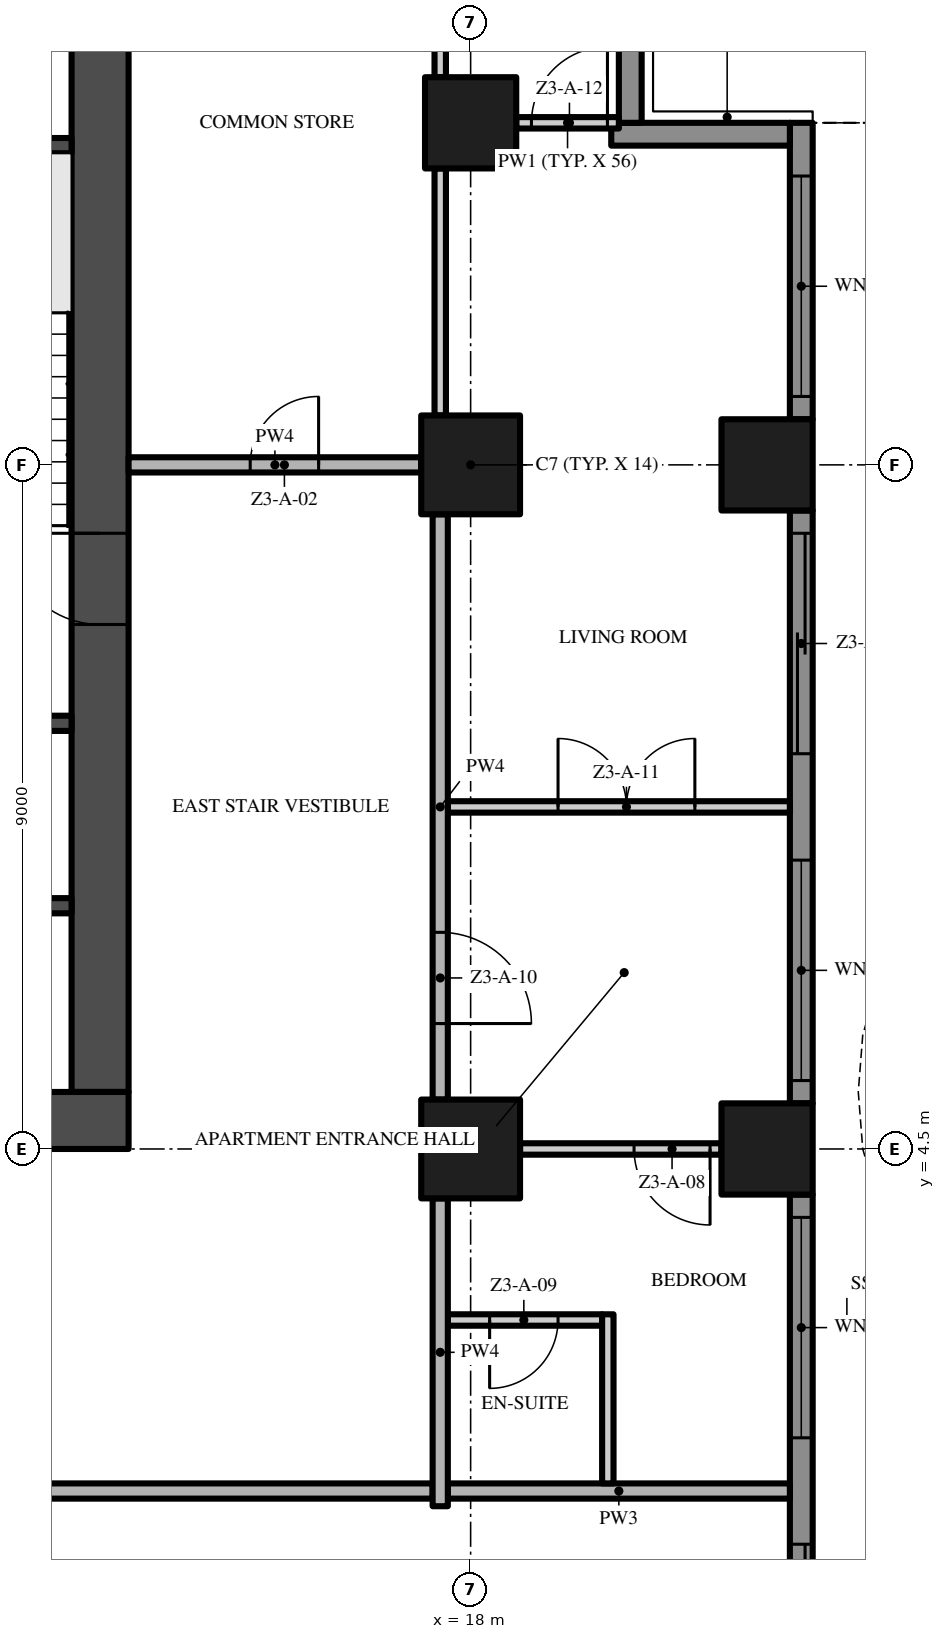
"""IFC4 building model, lengths in metres.
Left out: names, types, materials, properties, quantities, classifications, styles, units other than length and angle.
Written with IfcOpenShell. Run it as: python <this file> out.ifc"""

import sys

from ifc_helpers import new_model, si_unit, direction, frame, frame_2d, origin, origin_2d, place, context, subcontext, project, spatial, polyline, rectangle, outline, extrude, element, fill, save


model = new_model("IFC4")
c1 = context("Model", 3, precision=1e-05, world=origin(), true_north=direction((0.0, 1.0)))
c2 = subcontext(c1, "Body", "Model", "MODEL_VIEW")
j1 = project(units=[si_unit("LENGTHUNIT", "METRE"), si_unit("PLANEANGLEUNIT", "RADIAN")], contexts=[c1])
p1 = place(None, origin())
s1 = spatial("IfcSite", under=j1, at=p1, CompositionType="ELEMENT")
p2 = place(p1, origin())
s2 = spatial("IfcBuilding", under=s1, at=p2, CompositionType="ELEMENT")
p3 = place(p2, frame((0.0, 0.0, 128.8)))
s3 = spatial("IfcBuildingStorey", under=s2, at=p3, CompositionType="ELEMENT", Elevation=128.8)
p4 = place(p3, frame((-13.5, 4.875, -0.3), z_axis=(0.0, 0.0, 1.0), x_axis=(1.0, 0.0, 0.0)))
e1 = element("IfcWall", 1, at=p4, inside=s3, PredefinedType="SHEAR", context=c2, shape_type="SweptSolid", body=[
    extrude(rectangle(XDim=27.0, YDim=0.75, at=frame_2d((13.5, 0.0))), origin(), (0.0, 0.0, 1.0), 3.8),
])
p5 = place(p4, frame((12.0, 0.0, 0.3)))
e2 = element("IfcOpeningElement", 2, at=p5, cuts=e1, PredefinedType="OPENING", context=c2, shape_type="SweptSolid", body=[
    extrude(rectangle(XDim=3.0, YDim=2.4, at=frame_2d((1.5, 1.2))), frame((0.0, 0.385, 0.0), z_axis=(0.0, -1.0, 0.0), x_axis=(1.0, 0.0, 0.0)), (0.0, 0.0, 1.0), 0.77),
])
p6 = place(p4, frame((4.9, 0.0, 0.3)))
e3 = element("IfcOpeningElement", 3, at=p6, cuts=e1, PredefinedType="OPENING", context=c2, shape_type="SweptSolid", body=[
    extrude(rectangle(XDim=1.2, YDim=2.2, at=frame_2d((0.6, 1.1))), frame((0.0, 0.385, 0.0), z_axis=(0.0, -1.0, 0.0), x_axis=(1.0, 0.0, 0.0)), (0.0, 0.0, 1.0), 0.77),
])
p7 = place(p4, frame((20.75, 0.0, 0.3)))
e4 = element("IfcOpeningElement", 4, at=p7, cuts=e1, PredefinedType="OPENING", context=c2, shape_type="SweptSolid", body=[
    extrude(rectangle(XDim=1.5, YDim=2.2, at=frame_2d((0.75, 1.1))), frame((0.0, 0.385, 0.0), z_axis=(0.0, -1.0, 0.0), x_axis=(1.0, 0.0, 0.0)), (0.0, 0.0, 1.0), 0.77),
])
p8 = place(p4, frame((17.4, 0.0, 0.3)))
e5 = element("IfcOpeningElement", 5, at=p8, cuts=e1, PredefinedType="OPENING", context=c2, shape_type="SweptSolid", body=[
    extrude(rectangle(XDim=1.2, YDim=2.2, at=frame_2d((0.6, 1.1))), frame((0.0, 0.385, 0.0), z_axis=(0.0, -1.0, 0.0), x_axis=(1.0, 0.0, 0.0)), (0.0, 0.0, 1.0), 0.77),
])
p9 = place(p3, frame((13.125, 5.25, -0.3), z_axis=(0.0, 0.0, 1.0), x_axis=(0.0, 1.0, 0.0)))
e6 = element("IfcWall", 6, at=p9, inside=s3, PredefinedType="SHEAR", context=c2, shape_type="SweptSolid", body=[
    extrude(rectangle(XDim=16.5, YDim=0.75, at=frame_2d((8.25, 0.0))), origin(), (0.0, 0.0, 1.0), 3.8),
])
p10 = place(p9, frame((6.15, 0.0, 0.3)))
e7 = element("IfcOpeningElement", 7, at=p10, cuts=e6, PredefinedType="OPENING", context=c2, shape_type="SweptSolid", body=[
    extrude(rectangle(XDim=1.2, YDim=2.2, at=frame_2d((0.6, 1.1))), frame((0.0, 0.385, 0.0), z_axis=(0.0, -1.0, 0.0), x_axis=(1.0, 0.0, 0.0)), (0.0, 0.0, 1.0), 0.77),
])
for number, where, z_axis, x_axis in (
    (8, (18.0, 13.5, 0.0), (0.0, 0.0, 1.0), (1.0, 0.0, 0.0)),
    (9, (18.0, 4.5, 0.0), (0.0, 0.0, 1.0), (1.0, 0.0, 0.0)),
):
    element("IfcColumn", number, at=place(p3, frame(where, z_axis=z_axis, x_axis=x_axis)), inside=s3, PredefinedType="COLUMN", context=c2, shape_type="SweptSolid", body=[
        extrude(rectangle(XDim=1.3, YDim=1.3, at=origin_2d()), origin(), (0.0, 0.0, 1.0), 3.5),
    ])
for number, where, z_axis, x_axis in (
    (10, (21.9, 13.5, 0.0), (0.0, 0.0, 1.0), (1.0, 0.0, 0.0)),
    (11, (18.0, 18.0, 0.0), (0.0, 0.0, 1.0), (1.0, 0.0, 0.0)),
    (12, (21.9, 4.5, 0.0), (0.0, 0.0, 1.0), (1.0, 0.0, 0.0)),
):
    element("IfcColumn", number, at=place(p3, frame(where, z_axis=z_axis, x_axis=x_axis)), inside=s3, PredefinedType="COLUMN", context=c2, shape_type="SweptSolid", body=[
        extrude(rectangle(XDim=1.2, YDim=1.2, at=origin_2d()), origin(), (0.0, 0.0, 1.0), 3.5),
    ])
p11 = place(p3, frame((22.35, 3.9, 0.0), z_axis=(0.0, 0.0, 1.0), x_axis=(0.0, -1.0, 0.0)))
e13 = element("IfcWall", 13, at=p11, inside=s3, PredefinedType="SOLIDWALL", context=c2, shape_type="SweptSolid", body=[
    extrude(rectangle(XDim=7.8, YDim=0.3, at=frame_2d((3.9, 0.0))), origin(), (0.0, 0.0, 1.0), 3.5),
])
p12 = place(p11, frame((4.6, 0.0, 0.0)))
e14 = element("IfcOpeningElement", 14, at=p12, cuts=e13, PredefinedType="OPENING", context=c2, shape_type="SweptSolid", body=[
    extrude(rectangle(XDim=2.9, YDim=2.4, at=frame_2d((1.45, 1.2))), frame((0.0, 0.16, 0.0), z_axis=(0.0, -1.0, 0.0), x_axis=(1.0, 0.0, 0.0)), (0.0, 0.0, 1.0), 0.32),
])
p13 = place(p11, frame((0.3, 0.0, 0.45)))
e15 = element("IfcOpeningElement", 15, at=p13, cuts=e13, PredefinedType="OPENING", context=c2, shape_type="SweptSolid", body=[
    extrude(rectangle(XDim=2.9, YDim=2.65, at=frame_2d((1.45, 1.325))), frame((0.0, 0.16, 0.0), z_axis=(0.0, -1.0, 0.0), x_axis=(1.0, 0.0, 0.0)), (0.0, 0.0, 1.0), 0.32),
])
p14 = place(p3, frame((22.35, 12.9, 0.0), z_axis=(0.0, 0.0, 1.0), x_axis=(0.0, -1.0, 0.0)))
e16 = element("IfcWall", 16, at=p14, inside=s3, PredefinedType="SOLIDWALL", context=c2, shape_type="SweptSolid", body=[
    extrude(rectangle(XDim=7.8, YDim=0.3, at=frame_2d((3.9, 0.0))), origin(), (0.0, 0.0, 1.0), 3.5),
])
p15 = place(p14, frame((4.6, 0.0, 0.45)))
e17 = element("IfcOpeningElement", 17, at=p15, cuts=e16, PredefinedType="OPENING", context=c2, shape_type="SweptSolid", body=[
    extrude(rectangle(XDim=2.9, YDim=2.65, at=frame_2d((1.45, 1.325))), frame((0.0, 0.16, 0.0), z_axis=(0.0, -1.0, 0.0), x_axis=(1.0, 0.0, 0.0)), (0.0, 0.0, 1.0), 0.32),
])
p16 = place(p14, frame((0.3, 0.0, 0.0)))
e18 = element("IfcOpeningElement", 18, at=p16, cuts=e16, PredefinedType="OPENING", context=c2, shape_type="SweptSolid", body=[
    extrude(rectangle(XDim=2.9, YDim=2.4, at=frame_2d((1.45, 1.2))), frame((0.0, 0.16, 0.0), z_axis=(0.0, -1.0, 0.0), x_axis=(1.0, 0.0, 0.0)), (0.0, 0.0, 1.0), 0.32),
])
p17 = place(p3, frame((22.35, 18.0, 0.0), z_axis=(0.0, 0.0, 1.0), x_axis=(0.0, -1.0, 0.0)))
e19 = element("IfcWall", 19, at=p17, inside=s3, PredefinedType="SOLIDWALL", context=c2, shape_type="SweptSolid", body=[
    extrude(rectangle(XDim=3.9, YDim=0.3, at=frame_2d((1.95, 0.0))), origin(), (0.0, 0.0, 1.0), 3.5),
])
p18 = place(p17, frame((0.7, 0.0, 0.45)))
e20 = element("IfcOpeningElement", 20, at=p18, cuts=e19, PredefinedType="OPENING", context=c2, shape_type="SweptSolid", body=[
    extrude(rectangle(XDim=2.9, YDim=2.65, at=frame_2d((1.45, 1.325))), frame((0.0, 0.16, 0.0), z_axis=(0.0, -1.0, 0.0), x_axis=(1.0, 0.0, 0.0)), (0.0, 0.0, 1.0), 0.32),
])
p19 = place(p3, frame((19.85, 17.85, 0.0), z_axis=(0.0, 0.0, 1.0), x_axis=(1.0, 0.0, 0.0)))
e21 = element("IfcWall", 21, at=p19, inside=s3, PredefinedType="SOLIDWALL", context=c2, shape_type="SweptSolid", body=[
    extrude(rectangle(XDim=2.35, YDim=0.3, at=frame_2d((1.175, 0.0))), origin(), (0.0, 0.0, 1.0), 3.5),
])
p20 = place(p3, frame((20.1, 20.25, 0.0), z_axis=(0.0, 0.0, 1.0), x_axis=(0.0, -1.0, 0.0)))
e22 = element("IfcWall", 22, at=p20, inside=s3, PredefinedType="SOLIDWALL", context=c2, shape_type="SweptSolid", body=[
    extrude(rectangle(XDim=2.25, YDim=0.3, at=frame_2d((1.125, 0.0))), origin(), (0.0, 0.0, 1.0), 3.5),
])
p21 = place(p3, origin())
e23 = element("IfcWall", 23, at=p21, inside=s3, PredefinedType="USERDEFINED", context=c2, shape_type="SweptSolid", body=[
    extrude(outline(polyline([(24.3, -13.5), (23.595, -12.0), (23.159, -10.5), (23.1, -9.75), (23.159, -9.0), (23.595, -7.5), (24.3, -6.0), (25.005, -4.5), (25.441, -3.0), (25.5, -2.25), (25.441, -1.5), (25.005, 0.0), (24.3, 1.5), (23.595, 3.0), (23.159, 4.5), (23.1, 5.25), (23.159, 6.0), (23.595, 7.5), (24.3, 9.0), (25.005, 10.5), (25.441, 12.0), (25.5, 12.75), (25.441, 13.5), (25.005, 15.0), (24.3, 16.5), (23.595, 18.0), (23.368, 17.894), (24.074, 16.394), (24.771, 14.911), (25.194, 13.455), (25.249, 12.75), (25.194, 12.045), (24.771, 10.589), (24.074, 9.106), (23.36, 7.589), (22.911, 6.045), (22.849, 5.25), (22.911, 4.455), (23.36, 2.911), (24.074, 1.394), (24.771, -0.089), (25.194, -1.545), (25.249, -2.25), (25.194, -2.955), (24.771, -4.411), (24.074, -5.894), (23.36, -7.411), (22.911, -8.955), (22.849, -9.75), (22.911, -10.545), (23.36, -12.089), (24.074, -13.606), (24.3, -13.5)])), origin(), (0.0, 0.0, 1.0), 0.9),
])
for number, where, z_axis, x_axis in (
    (24, (9.65, 7.7, 0.0), (0.0, 0.0, 1.0), (1.0, 0.0, 0.0)),
    (25, (9.65, 10.1, 0.0), (0.0, 0.0, 1.0), (1.0, 0.0, 0.0)),
    (26, (9.65, 17.7, 0.0), (0.0, 0.0, 1.0), (1.0, 0.0, 0.0)),
):
    element("IfcWall", number, at=place(p3, frame(where, z_axis=z_axis, x_axis=x_axis)), inside=s3, PredefinedType="SHEAR", context=c2, shape_type="SweptSolid", body=[
        extrude(rectangle(XDim=3.1, YDim=0.2, at=frame_2d((1.55, 0.0))), origin(), (0.0, 0.0, 1.0), 3.5),
    ])
p22 = place(p3, frame((17.5, 0.0, 0.0), z_axis=(0.0, 0.0, 1.0), x_axis=(-1.0, 0.0, 0.0)))
e27 = element("IfcWall", 27, at=p22, inside=s3, PredefinedType="PARTITIONING", context=c2, shape_type="SweptSolid", body=[
    extrude(rectangle(XDim=35.0, YDim=0.2, at=frame_2d((17.5, 0.0))), origin(), (0.0, 0.0, 1.0), 3.5),
])
p23 = place(p22, frame((16.75, 0.0, 0.0)))
e28 = element("IfcOpeningElement", 28, at=p23, cuts=e27, PredefinedType="OPENING", context=c2, shape_type="SweptSolid", body=[
    extrude(rectangle(XDim=1.5, YDim=2.4, at=frame_2d((0.75, 1.2))), frame((0.0, 0.11, 0.0), z_axis=(0.0, -1.0, 0.0), x_axis=(1.0, 0.0, 0.0)), (0.0, 0.0, 1.0), 0.22),
])
p24 = place(p3, frame((17.7, 0.0, 0.0), z_axis=(0.0, 0.0, 1.0), x_axis=(1.0, 0.0, 0.0)))
e29 = element("IfcWall", 29, at=p24, inside=s3, PredefinedType="PARTITIONING", context=c2, shape_type="SweptSolid", body=[
    extrude(rectangle(XDim=4.5, YDim=0.2, at=frame_2d((2.25, 0.0))), origin(), (0.0, 0.0, 1.0), 3.5),
])
p25 = place(p3, frame((19.73, 2.25, 0.0), z_axis=(0.0, 0.0, 1.0), x_axis=(-1.0, 0.0, 0.0)))
e30 = element("IfcWall", 30, at=p25, inside=s3, PredefinedType="PARTITIONING", context=c2, shape_type="SweptSolid", body=[
    extrude(rectangle(XDim=2.03, YDim=0.15, at=frame_2d((1.015, 0.0))), origin(), (0.0, 0.0, 1.0), 3.5),
])
p26 = place(p25, frame((0.58, 0.0, 0.0)))
e31 = element("IfcOpeningElement", 31, at=p26, cuts=e30, PredefinedType="OPENING", context=c2, shape_type="SweptSolid", body=[
    extrude(rectangle(XDim=0.9, YDim=2.1, at=frame_2d((0.45, 1.05))), frame((0.0, 0.085, 0.0), z_axis=(0.0, -1.0, 0.0), x_axis=(1.0, 0.0, 0.0)), (0.0, 0.0, 1.0), 0.17),
])
p27 = place(p3, frame((21.3, 4.5, 0.0), z_axis=(0.0, 0.0, 1.0), x_axis=(-1.0, 0.0, 0.0)))
e32 = element("IfcWall", 32, at=p27, inside=s3, PredefinedType="PARTITIONING", context=c2, shape_type="SweptSolid", body=[
    extrude(rectangle(XDim=2.65, YDim=0.15, at=frame_2d((1.325, 0.0))), origin(), (0.0, 0.0, 1.0), 3.5),
])
p28 = place(p27, frame((0.15, 0.0, 0.0)))
e33 = element("IfcOpeningElement", 33, at=p28, cuts=e32, PredefinedType="OPENING", context=c2, shape_type="SweptSolid", body=[
    extrude(rectangle(XDim=1.0, YDim=2.4, at=frame_2d((0.5, 1.2))), frame((0.0, 0.085, 0.0), z_axis=(0.0, -1.0, 0.0), x_axis=(1.0, 0.0, 0.0)), (0.0, 0.0, 1.0), 0.17),
])
p29 = place(p3, frame((17.7, 9.0, 0.0), z_axis=(0.0, 0.0, 1.0), x_axis=(1.0, 0.0, 0.0)))
e34 = element("IfcWall", 34, at=p29, inside=s3, PredefinedType="PARTITIONING", context=c2, shape_type="SweptSolid", body=[
    extrude(rectangle(XDim=4.5, YDim=0.15, at=frame_2d((2.25, 0.0))), origin(), (0.0, 0.0, 1.0), 3.5),
])
p30 = place(p29, frame((1.45, 0.0, 0.0)))
e35 = element("IfcOpeningElement", 35, at=p30, cuts=e34, PredefinedType="OPENING", context=c2, shape_type="SweptSolid", body=[
    extrude(rectangle(XDim=1.8, YDim=2.4, at=frame_2d((0.9, 1.2))), frame((0.0, 0.085, 0.0), z_axis=(0.0, -1.0, 0.0), x_axis=(1.0, 0.0, 0.0)), (0.0, 0.0, 1.0), 0.17),
])
p31 = place(p3, frame((13.5, 13.5, 0.0), z_axis=(0.0, 0.0, 1.0), x_axis=(1.0, 0.0, 0.0)))
e36 = element("IfcWall", 36, at=p31, inside=s3, PredefinedType="PARTITIONING", context=c2, shape_type="SweptSolid", body=[
    extrude(rectangle(XDim=3.85, YDim=0.2, at=frame_2d((1.925, 0.0))), origin(), (0.0, 0.0, 1.0), 3.5),
])
p32 = place(p31, frame((1.6, 0.0, 0.0)))
e37 = element("IfcOpeningElement", 37, at=p32, cuts=e36, PredefinedType="OPENING", context=c2, shape_type="SweptSolid", body=[
    extrude(rectangle(XDim=0.9, YDim=2.1, at=frame_2d((0.45, 1.05))), frame((0.0, 0.11, 0.0), z_axis=(0.0, -1.0, 0.0), x_axis=(1.0, 0.0, 0.0)), (0.0, 0.0, 1.0), 0.22),
])
p33 = place(p3, frame((18.6, 18.0, 0.0), z_axis=(0.0, 0.0, 1.0), x_axis=(1.0, 0.0, 0.0)))
e38 = element("IfcWall", 38, at=p33, inside=s3, PredefinedType="PARTITIONING", context=c2, shape_type="SweptSolid", body=[
    extrude(rectangle(XDim=1.35, YDim=0.15, at=frame_2d((0.675, 0.0))), origin(), (0.0, 0.0, 1.0), 3.5),
])
p34 = place(p33, frame((0.2, 0.0, 0.0)))
e39 = element("IfcOpeningElement", 39, at=p34, cuts=e38, PredefinedType="OPENING", context=c2, shape_type="SweptSolid", body=[
    extrude(rectangle(XDim=1.0, YDim=2.4, at=frame_2d((0.5, 1.2))), frame((0.0, 0.085, 0.0), z_axis=(0.0, -1.0, 0.0), x_axis=(1.0, 0.0, 0.0)), (0.0, 0.0, 1.0), 0.17),
])
p35 = place(p3, frame((17.6, -0.2, 0.0), z_axis=(0.0, 0.0, 1.0), x_axis=(0.0, 1.0, 0.0)))
e40 = element("IfcWall", 40, at=p35, inside=s3, PredefinedType="PARTITIONING", context=c2, shape_type="SweptSolid", body=[
    extrude(rectangle(XDim=4.05, YDim=0.2, at=frame_2d((2.025, 0.0))), origin(), (0.0, 0.0, 1.0), 3.5),
])
p36 = place(p3, frame((17.6, 12.85, 0.0), z_axis=(0.0, 0.0, 1.0), x_axis=(0.0, -1.0, 0.0)))
e41 = element("IfcWall", 41, at=p36, inside=s3, PredefinedType="PARTITIONING", context=c2, shape_type="SweptSolid", body=[
    extrude(rectangle(XDim=7.7, YDim=0.2, at=frame_2d((3.85, 0.0))), origin(), (0.0, 0.0, 1.0), 3.5),
])
p37 = place(p36, frame((5.5, 0.0, 0.0)))
e42 = element("IfcOpeningElement", 42, at=p37, cuts=e41, PredefinedType="OPENING", context=c2, shape_type="SweptSolid", body=[
    extrude(rectangle(XDim=1.2, YDim=2.4, at=frame_2d((0.6, 1.2))), frame((0.0, 0.11, 0.0), z_axis=(0.0, -1.0, 0.0), x_axis=(1.0, 0.0, 0.0)), (0.0, 0.0, 1.0), 0.22),
])
p38 = place(p3, frame((17.6, 14.15, 0.0), z_axis=(0.0, 0.0, 1.0), x_axis=(0.0, 1.0, 0.0)))
e43 = element("IfcWall", 43, at=p38, inside=s3, PredefinedType="PARTITIONING", context=c2, shape_type="SweptSolid", body=[
    extrude(rectangle(XDim=3.25, YDim=0.15, at=frame_2d((1.625, 0.0))), origin(), (0.0, 0.0, 1.0), 3.5),
])
p39 = place(p3, frame((17.6, 18.6, 0.0), z_axis=(0.0, 0.0, 1.0), x_axis=(0.0, 1.0, 0.0)))
e44 = element("IfcWall", 44, at=p39, inside=s3, PredefinedType="PARTITIONING", context=c2, shape_type="SweptSolid", body=[
    extrude(rectangle(XDim=2.7, YDim=0.15, at=frame_2d((1.35, 0.0))), origin(), (0.0, 0.0, 1.0), 3.5),
])
p40 = place(p3, frame((19.805, 0.1, 0.0), z_axis=(0.0, 0.0, 1.0), x_axis=(0.0, 1.0, 0.0)))
e45 = element("IfcWall", 45, at=p40, inside=s3, PredefinedType="PARTITIONING", context=c2, shape_type="SweptSolid", body=[
    extrude(rectangle(XDim=2.225, YDim=0.15, at=frame_2d((1.113, 0.0))), origin(), (0.0, 0.0, 1.0), 3.5),
])
p41 = place(p12, origin())
e46 = element("IfcDoor", 46, at=p41, inside=s3, OperationType="SINGLE_SWING_LEFT", PredefinedType="DOOR", context=c2, shape_type="SweptSolid", body=[
    extrude(rectangle(XDim=2.9, YDim=2.4, at=frame_2d((1.45, 1.2))), frame((0.0, 0.025, 0.0), z_axis=(0.0, -1.0, 0.0), x_axis=(1.0, 0.0, 0.0)), (0.0, 0.0, 1.0), 0.05),
])
fill(e14, e46)
p42 = place(p13, origin())
e47 = element("IfcWindow", 47, at=p42, inside=s3, PartitioningType="SINGLE_PANEL", PredefinedType="WINDOW", context=c2, shape_type="SweptSolid", body=[
    extrude(rectangle(XDim=2.9, YDim=2.65, at=frame_2d((1.45, 1.325))), frame((0.0, 0.03, 0.0), z_axis=(0.0, -1.0, 0.0), x_axis=(1.0, 0.0, 0.0)), (0.0, 0.0, 1.0), 0.06),
])
fill(e15, e47)
p43 = place(p15, origin())
e48 = element("IfcWindow", 48, at=p43, inside=s3, PartitioningType="SINGLE_PANEL", PredefinedType="WINDOW", context=c2, shape_type="SweptSolid", body=[
    extrude(rectangle(XDim=2.9, YDim=2.65, at=frame_2d((1.45, 1.325))), frame((0.0, 0.03, 0.0), z_axis=(0.0, -1.0, 0.0), x_axis=(1.0, 0.0, 0.0)), (0.0, 0.0, 1.0), 0.06),
])
fill(e17, e48)
p44 = place(p16, origin())
e49 = element("IfcDoor", 49, at=p44, inside=s3, OperationType="SINGLE_SWING_LEFT", PredefinedType="DOOR", context=c2, shape_type="SweptSolid", body=[
    extrude(rectangle(XDim=2.9, YDim=2.4, at=frame_2d((1.45, 1.2))), frame((0.0, 0.025, 0.0), z_axis=(0.0, -1.0, 0.0), x_axis=(1.0, 0.0, 0.0)), (0.0, 0.0, 1.0), 0.05),
])
fill(e18, e49)
p45 = place(p18, origin())
e50 = element("IfcWindow", 50, at=p45, inside=s3, PartitioningType="SINGLE_PANEL", PredefinedType="WINDOW", context=c2, shape_type="SweptSolid", body=[
    extrude(rectangle(XDim=2.9, YDim=2.65, at=frame_2d((1.45, 1.325))), frame((0.0, 0.03, 0.0), z_axis=(0.0, -1.0, 0.0), x_axis=(1.0, 0.0, 0.0)), (0.0, 0.0, 1.0), 0.06),
])
fill(e20, e50)
p46 = place(p10, frame((1.2, 0.0, 0.0), z_axis=(0.0, 0.0, 1.0), x_axis=(-1.0, 0.0, 0.0)))
e51 = element("IfcDoor", 51, at=p46, inside=s3, OperationType="SINGLE_SWING_LEFT", PredefinedType="DOOR", context=c2, shape_type="SweptSolid", body=[
    extrude(rectangle(XDim=1.2, YDim=2.2, at=frame_2d((0.6, 1.1))), frame((0.0, 0.025, 0.0), z_axis=(0.0, -1.0, 0.0), x_axis=(1.0, 0.0, 0.0)), (0.0, 0.0, 1.0), 0.05),
])
fill(e7, e51)
p47 = place(p32, origin())
e52 = element("IfcDoor", 52, at=p47, inside=s3, OperationType="SINGLE_SWING_RIGHT", PredefinedType="DOOR", context=c2, shape_type="SweptSolid", body=[
    extrude(rectangle(XDim=0.9, YDim=2.1, at=frame_2d((0.45, 1.05))), frame((0.0, 0.025, 0.0), z_axis=(0.0, -1.0, 0.0), x_axis=(1.0, 0.0, 0.0)), (0.0, 0.0, 1.0), 0.05),
])
fill(e37, e52)
p48 = place(p28, origin())
e53 = element("IfcDoor", 53, at=p48, inside=s3, OperationType="SINGLE_SWING_LEFT", PredefinedType="DOOR", context=c2, shape_type="SweptSolid", body=[
    extrude(rectangle(XDim=1.0, YDim=2.4, at=frame_2d((0.5, 1.2))), frame((0.0, 0.025, 0.0), z_axis=(0.0, -1.0, 0.0), x_axis=(1.0, 0.0, 0.0)), (0.0, 0.0, 1.0), 0.05),
])
fill(e33, e53)
p49 = place(p26, origin())
e54 = element("IfcDoor", 54, at=p49, inside=s3, OperationType="SINGLE_SWING_RIGHT", PredefinedType="DOOR", context=c2, shape_type="SweptSolid", body=[
    extrude(rectangle(XDim=0.9, YDim=2.1, at=frame_2d((0.45, 1.05))), frame((0.0, 0.025, 0.0), z_axis=(0.0, -1.0, 0.0), x_axis=(1.0, 0.0, 0.0)), (0.0, 0.0, 1.0), 0.05),
])
fill(e31, e54)
p50 = place(p37, origin())
e55 = element("IfcDoor", 55, at=p50, inside=s3, OperationType="SINGLE_SWING_RIGHT", PredefinedType="DOOR", context=c2, shape_type="SweptSolid", body=[
    extrude(rectangle(XDim=1.2, YDim=2.4, at=frame_2d((0.6, 1.2))), frame((0.0, 0.025, 0.0), z_axis=(0.0, -1.0, 0.0), x_axis=(1.0, 0.0, 0.0)), (0.0, 0.0, 1.0), 0.05),
])
fill(e42, e55)
p51 = place(p30, origin())
e56 = element("IfcDoor", 56, at=p51, inside=s3, OperationType="DOUBLE_DOOR_SINGLE_SWING", PredefinedType="DOOR", context=c2, shape_type="SweptSolid", body=[
    extrude(rectangle(XDim=1.8, YDim=2.4, at=frame_2d((0.9, 1.2))), frame((0.0, 0.025, 0.0), z_axis=(0.0, -1.0, 0.0), x_axis=(1.0, 0.0, 0.0)), (0.0, 0.0, 1.0), 0.05),
])
fill(e35, e56)
p52 = place(p34, origin())
e57 = element("IfcDoor", 57, at=p52, inside=s3, OperationType="SINGLE_SWING_RIGHT", PredefinedType="DOOR", context=c2, shape_type="SweptSolid", body=[
    extrude(rectangle(XDim=1.0, YDim=2.4, at=frame_2d((0.5, 1.2))), frame((0.0, 0.025, 0.0), z_axis=(0.0, -1.0, 0.0), x_axis=(1.0, 0.0, 0.0)), (0.0, 0.0, 1.0), 0.05),
])
fill(e39, e57)
save(model, sys.argv[1])
